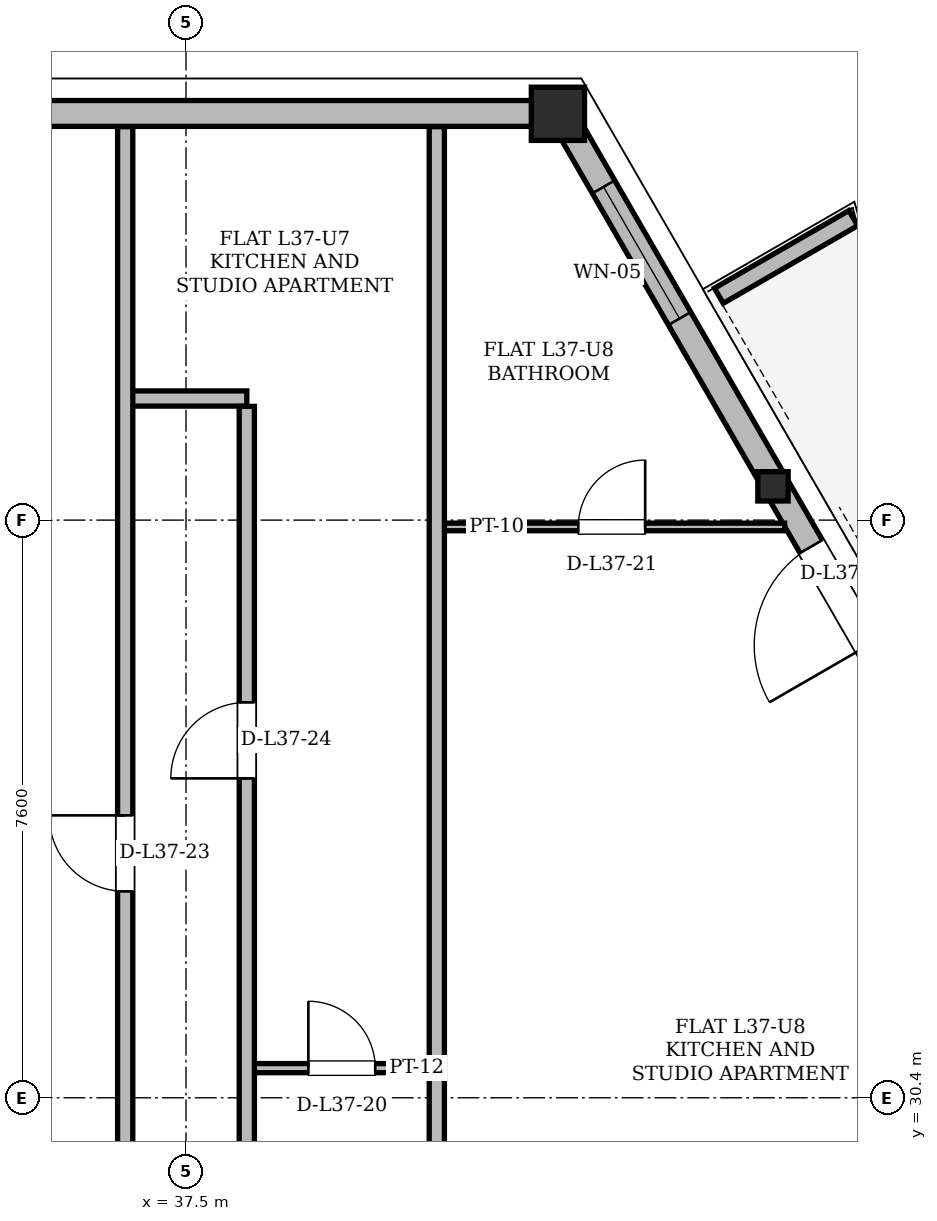
"""IFC4 building model, lengths in metres.
Left out: names, types, materials, properties, quantities, classifications, styles, units other than length and angle.
Written with IfcOpenShell. Run it as: python <this file> out.ifc"""

import sys

from ifc_helpers import new_model, si_unit, direction, frame, frame_2d, origin, origin_2d, place, context, subcontext, project, spatial, polyline, rectangle, hollow_rectangle, i_section, outline, extrude, element, fill, save


model = new_model("IFC4")
c1 = context("Model", 3, precision=1e-05, world=origin(), true_north=direction((0.0, 1.0)))
c2 = subcontext(c1, "Body", "Model", "MODEL_VIEW")
j1 = project(units=[si_unit("LENGTHUNIT", "METRE"), si_unit("PLANEANGLEUNIT", "RADIAN")], contexts=[c1])
p1 = place(None, origin())
s1 = spatial("IfcSite", under=j1, at=p1, CompositionType="ELEMENT")
p2 = place(p1, origin())
s2 = spatial("IfcBuilding", under=s1, at=p2, CompositionType="ELEMENT")
p3 = place(p2, frame((0.0, 0.0, 142.2)))
s3 = spatial("IfcBuildingStorey", under=s2, at=p3, CompositionType="ELEMENT", Elevation=142.2)
p4 = place(p3, frame((42.436, 43.35, 0.005), z_axis=(-0.023789759074, -0.002582888128, 0.999713647027), x_axis=(0.107937124158, -0.994157722511, 0.0)))
e1 = element("IfcColumn", 1, at=p4, inside=s3, PredefinedType="COLUMN", context=c2, shape_type="SweptSolid", body=[
    extrude(hollow_rectangle(XDim=0.7, YDim=0.7, WallThickness=0.055, at=origin_2d()), origin(), (0.0, 0.0, 1.0), 3.592),
])
p5 = place(p3, frame((45.263, 38.454, 0.005), z_axis=(-0.022159054275, -0.005301859612, 0.999740399603), x_axis=(0.232695903295, -0.972549544542, 0.0)))
e2 = element("IfcColumn", 2, at=p5, inside=s3, PredefinedType="COLUMN", context=c2, shape_type="SweptSolid", body=[
    extrude(i_section(OverallWidth=0.399, OverallDepth=0.386, WebThickness=0.021, FlangeThickness=0.033, at=origin_2d()), origin(), (0.0, 0.0, 1.0), 3.592),
])
p6 = place(p3, frame((60.103, 12.75, 0.0), z_axis=(0.0, 0.0, 1.0), x_axis=(-0.500002563111, 0.866023923966, 0.0)))
e3 = element("IfcWall", 3, at=p6, inside=s3, PredefinedType="SOLIDWALL", context=c2, shape_type="SweptSolid", body=[
    extrude(rectangle(XDim=35.334, YDim=0.34, at=frame_2d((17.667, 0.0))), origin(), (0.0, 0.0, 1.0), 2.58),
])
p7 = place(p6, frame((8.034, 0.0, 0.0)))
e4 = element("IfcOpeningElement", 4, at=p7, cuts=e3, PredefinedType="OPENING", context=c2, shape_type="SweptSolid", body=[
    extrude(rectangle(XDim=1.5, YDim=2.2, at=frame_2d((0.75, 1.1))), frame((0.0, 0.17, 0.0), z_axis=(0.0, -1.0, 0.0), x_axis=(1.0, 0.0, 0.0)), (0.0, 0.0, 1.0), 0.34),
])
p8 = place(p6, frame((27.255, 0.0, 0.0)))
e5 = element("IfcOpeningElement", 5, at=p8, cuts=e3, PredefinedType="OPENING", context=c2, shape_type="SweptSolid", body=[
    extrude(rectangle(XDim=1.5, YDim=2.2, at=frame_2d((0.75, 1.1))), frame((0.0, 0.17, 0.0), z_axis=(0.0, -1.0, 0.0), x_axis=(1.0, 0.0, 0.0)), (0.0, 0.0, 1.0), 0.34),
])
p9 = place(p6, frame((3.622, 0.0, 0.85)))
e6 = element("IfcOpeningElement", 6, at=p9, cuts=e3, PredefinedType="OPENING", context=c2, shape_type="SweptSolid", body=[
    extrude(rectangle(XDim=1.2, YDim=1.48, at=frame_2d((0.6, 0.74))), frame((0.0, 0.17, 0.0), z_axis=(0.0, -1.0, 0.0), x_axis=(1.0, 0.0, 0.0)), (0.0, 0.0, 1.0), 0.34),
])
p10 = place(p6, frame((11.8, 0.0, 0.85)))
e7 = element("IfcOpeningElement", 7, at=p10, cuts=e3, PredefinedType="OPENING", context=c2, shape_type="SweptSolid", body=[
    extrude(rectangle(XDim=1.2, YDim=1.48, at=frame_2d((0.6, 0.74))), frame((0.0, 0.17, 0.0), z_axis=(0.0, -1.0, 0.0), x_axis=(1.0, 0.0, 0.0)), (0.0, 0.0, 1.0), 0.34),
])
p11 = place(p6, frame((15.268, 0.0, 0.85)))
e8 = element("IfcOpeningElement", 8, at=p11, cuts=e3, PredefinedType="OPENING", context=c2, shape_type="SweptSolid", body=[
    extrude(rectangle(XDim=2.8, YDim=1.62, at=frame_2d((1.4, 0.81))), frame((0.0, 0.17, 0.0), z_axis=(0.0, -1.0, 0.0), x_axis=(1.0, 0.0, 0.0)), (0.0, 0.0, 1.0), 0.34),
])
p12 = place(p6, frame((25.555, 0.0, 0.85)))
e9 = element("IfcOpeningElement", 9, at=p12, cuts=e3, PredefinedType="OPENING", context=c2, shape_type="SweptSolid", body=[
    extrude(rectangle(XDim=1.2, YDim=1.48, at=frame_2d((0.6, 0.74))), frame((0.0, 0.17, 0.0), z_axis=(0.0, -1.0, 0.0), x_axis=(1.0, 0.0, 0.0)), (0.0, 0.0, 1.0), 0.34),
])
p13 = place(p6, frame((32.219, 0.0, 0.85)))
e10 = element("IfcOpeningElement", 10, at=p13, cuts=e3, PredefinedType="OPENING", context=c2, shape_type="SweptSolid", body=[
    extrude(rectangle(XDim=2.0, YDim=1.62, at=frame_2d((1.0, 0.81))), frame((0.0, 0.17, 0.0), z_axis=(0.0, -1.0, 0.0), x_axis=(1.0, 0.0, 0.0)), (0.0, 0.0, 1.0), 0.34),
])
p14 = place(p3, frame((42.436, 43.35, 0.0), z_axis=(0.0, 0.0, 1.0), x_axis=(-1.0, 0.0, 0.0)))
e11 = element("IfcWall", 11, at=p14, inside=s3, PredefinedType="SOLIDWALL", context=c2, shape_type="SweptSolid", body=[
    extrude(rectangle(XDim=9.872, YDim=0.34, at=frame_2d((4.936, 0.0))), origin(), (0.0, 0.0, 1.0), 2.58),
])
p15 = place(p3, frame((44.511, 40.952, 0.0), z_axis=(0.0, 0.0, 1.0), x_axis=(0.866012356593, 0.500022597718, 0.0)))
e12 = element("IfcWall", 12, at=p15, inside=s3, PredefinedType="PARAPET", context=c2, shape_type="SweptSolid", body=[
    extrude(outline(polyline([(0.0, 0.0), (2.042, 0.0), (2.042, 1.1), (0.0, 1.32), (0.0, 0.0)])), frame((0.0, 0.115, 0.0), z_axis=(0.0, -1.0, 0.0), x_axis=(1.0, 0.0, 0.0)), (0.0, 0.0, 1.0), 0.23),
])
p16 = place(p3, frame((38.218, 30.79, 0.0), z_axis=(0.0, 0.0, 1.0), x_axis=(1.0, 0.0, 0.0)))
e13 = element("IfcWall", 13, at=p16, inside=s3, PredefinedType="PARTITIONING", context=c2, shape_type="SweptSolid", body=[
    extrude(rectangle(XDim=2.664, YDim=0.12, at=frame_2d((1.332, 0.0))), origin(), (0.0, 0.0, 1.0), 3.36),
])
p17 = place(p16, frame((0.892, 0.0, 0.0)))
e14 = element("IfcOpeningElement", 14, at=p17, cuts=e13, PredefinedType="OPENING", context=c2, shape_type="SweptSolid", body=[
    extrude(rectangle(XDim=0.88, YDim=2.08, at=frame_2d((0.44, 1.04))), frame((0.0, 0.06, 0.0), z_axis=(0.0, -1.0, 0.0), x_axis=(1.0, 0.0, 0.0)), (0.0, 0.0, 1.0), 0.12),
])
p18 = place(p3, frame((40.718, 37.91, 0.0), z_axis=(0.0, 0.0, 1.0), x_axis=(1.0, 0.0, 0.0)))
e15 = element("IfcWall", 15, at=p18, inside=s3, PredefinedType="PARTITIONING", context=c2, shape_type="SweptSolid", body=[
    extrude(rectangle(XDim=4.658, YDim=0.1, at=frame_2d((2.329, 0.0))), origin(), (0.0, 0.0, 1.0), 3.36),
])
p19 = place(p18, frame((1.944, 0.0, 0.0)))
e16 = element("IfcOpeningElement", 16, at=p19, cuts=e15, PredefinedType="OPENING", context=c2, shape_type="SweptSolid", body=[
    extrude(rectangle(XDim=0.88, YDim=2.08, at=frame_2d((0.44, 1.04))), frame((0.0, 0.05, 0.0), z_axis=(0.0, -1.0, 0.0), x_axis=(1.0, 0.0, 0.0)), (0.0, 0.0, 1.0), 0.1),
])
p20 = place(p3, frame((36.7, 39.6, 0.0), z_axis=(0.0, 0.0, 1.0), x_axis=(1.0, 0.0, 0.0)))
e17 = element("IfcWall", 17, at=p20, inside=s3, PredefinedType="PARTITIONING", context=c2, shape_type="SweptSolid", body=[
    extrude(rectangle(XDim=1.6, YDim=0.2, at=frame_2d((0.8, 0.0))), origin(), (0.0, 0.0, 1.0), 3.36),
])
p21 = place(p3, frame((36.7, 26.074, 0.0), z_axis=(0.0, 0.0, 1.0), x_axis=(0.0, 1.0, 0.0)))
e18 = element("IfcWall", 18, at=p21, inside=s3, PredefinedType="PARTITIONING", context=c2, shape_type="SweptSolid", body=[
    extrude(rectangle(XDim=17.102, YDim=0.2, at=frame_2d((8.551, 0.0))), origin(), (0.0, 0.0, 1.0), 3.36),
])
p22 = place(p21, frame((7.042, 0.0, 0.0)))
e19 = element("IfcOpeningElement", 19, at=p22, cuts=e18, PredefinedType="OPENING", context=c2, shape_type="SweptSolid", body=[
    extrude(rectangle(XDim=1.0, YDim=2.18, at=frame_2d((0.5, 1.09))), frame((0.0, 0.1, 0.0), z_axis=(0.0, -1.0, 0.0), x_axis=(1.0, 0.0, 0.0)), (0.0, 0.0, 1.0), 0.2),
])
p23 = place(p3, frame((38.3, 26.074, 0.0), z_axis=(0.0, 0.0, 1.0), x_axis=(0.0, 1.0, 0.0)))
e20 = element("IfcWall", 20, at=p23, inside=s3, PredefinedType="PARTITIONING", context=c2, shape_type="SweptSolid", body=[
    extrude(rectangle(XDim=13.422, YDim=0.2, at=frame_2d((6.711, 0.0))), origin(), (0.0, 0.0, 1.0), 3.36),
])
p24 = place(p23, frame((8.528, 0.0, 0.0)))
e21 = element("IfcOpeningElement", 21, at=p24, cuts=e20, PredefinedType="OPENING", context=c2, shape_type="SweptSolid", body=[
    extrude(rectangle(XDim=1.0, YDim=2.18, at=frame_2d((0.5, 1.09))), frame((0.0, 0.1, 0.0), z_axis=(0.0, -1.0, 0.0), x_axis=(1.0, 0.0, 0.0)), (0.0, 0.0, 1.0), 0.2),
])
p25 = place(p3, frame((40.8, 26.074, 0.0), z_axis=(0.0, 0.0, 1.0), x_axis=(0.0, 1.0, 0.0)))
e22 = element("IfcWall", 22, at=p25, inside=s3, PredefinedType="PARTITIONING", context=c2, shape_type="SweptSolid", body=[
    extrude(rectangle(XDim=17.102, YDim=0.2, at=frame_2d((8.551, 0.0))), origin(), (0.0, 0.0, 1.0), 3.36),
])
p26 = place(p8, origin())
e23 = element("IfcDoor", 23, at=p26, inside=s3, OperationType="SINGLE_SWING_LEFT", PredefinedType="DOOR", context=c2, shape_type="SweptSolid", body=[
    extrude(rectangle(XDim=1.5, YDim=2.2, at=frame_2d((0.75, 1.1))), frame((0.0, 0.025, 0.0), z_axis=(0.0, -1.0, 0.0), x_axis=(1.0, 0.0, 0.0)), (0.0, 0.0, 1.0), 0.05),
])
fill(e5, e23)
p27 = place(p13, origin())
e24 = element("IfcWindow", 24, at=p27, inside=s3, PartitioningType="SINGLE_PANEL", PredefinedType="WINDOW", context=c2, shape_type="SweptSolid", body=[
    extrude(rectangle(XDim=2.0, YDim=1.62, at=frame_2d((1.0, 0.81))), frame((0.0, 0.03, 0.0), z_axis=(0.0, -1.0, 0.0), x_axis=(1.0, 0.0, 0.0)), (0.0, 0.0, 1.0), 0.06),
])
fill(e10, e24)
p28 = place(p17, origin())
e25 = element("IfcDoor", 25, at=p28, inside=s3, OperationType="SINGLE_SWING_LEFT", PredefinedType="DOOR", context=c2, shape_type="SweptSolid", body=[
    extrude(rectangle(XDim=0.88, YDim=2.08, at=frame_2d((0.44, 1.04))), frame((0.0, 0.025, 0.0), z_axis=(0.0, -1.0, 0.0), x_axis=(1.0, 0.0, 0.0)), (0.0, 0.0, 1.0), 0.05),
])
fill(e14, e25)
p29 = place(p19, origin())
e26 = element("IfcDoor", 26, at=p29, inside=s3, OperationType="SINGLE_SWING_RIGHT", PredefinedType="DOOR", context=c2, shape_type="SweptSolid", body=[
    extrude(rectangle(XDim=0.88, YDim=2.08, at=frame_2d((0.44, 1.04))), frame((0.0, 0.025, 0.0), z_axis=(0.0, -1.0, 0.0), x_axis=(1.0, 0.0, 0.0)), (0.0, 0.0, 1.0), 0.05),
])
fill(e16, e26)
p30 = place(p22, origin())
e27 = element("IfcDoor", 27, at=p30, inside=s3, OperationType="SINGLE_SWING_RIGHT", PredefinedType="DOOR", context=c2, shape_type="SweptSolid", body=[
    extrude(rectangle(XDim=1.0, YDim=2.18, at=frame_2d((0.5, 1.09))), frame((0.0, 0.025, 0.0), z_axis=(0.0, -1.0, 0.0), x_axis=(1.0, 0.0, 0.0)), (0.0, 0.0, 1.0), 0.05),
])
fill(e19, e27)
p31 = place(p24, origin())
e28 = element("IfcDoor", 28, at=p31, inside=s3, OperationType="SINGLE_SWING_LEFT", PredefinedType="DOOR", context=c2, shape_type="SweptSolid", body=[
    extrude(rectangle(XDim=1.0, YDim=2.18, at=frame_2d((0.5, 1.09))), frame((0.0, 0.025, 0.0), z_axis=(0.0, -1.0, 0.0), x_axis=(1.0, 0.0, 0.0)), (0.0, 0.0, 1.0), 0.05),
])
fill(e21, e28)
save(model, sys.argv[1])
